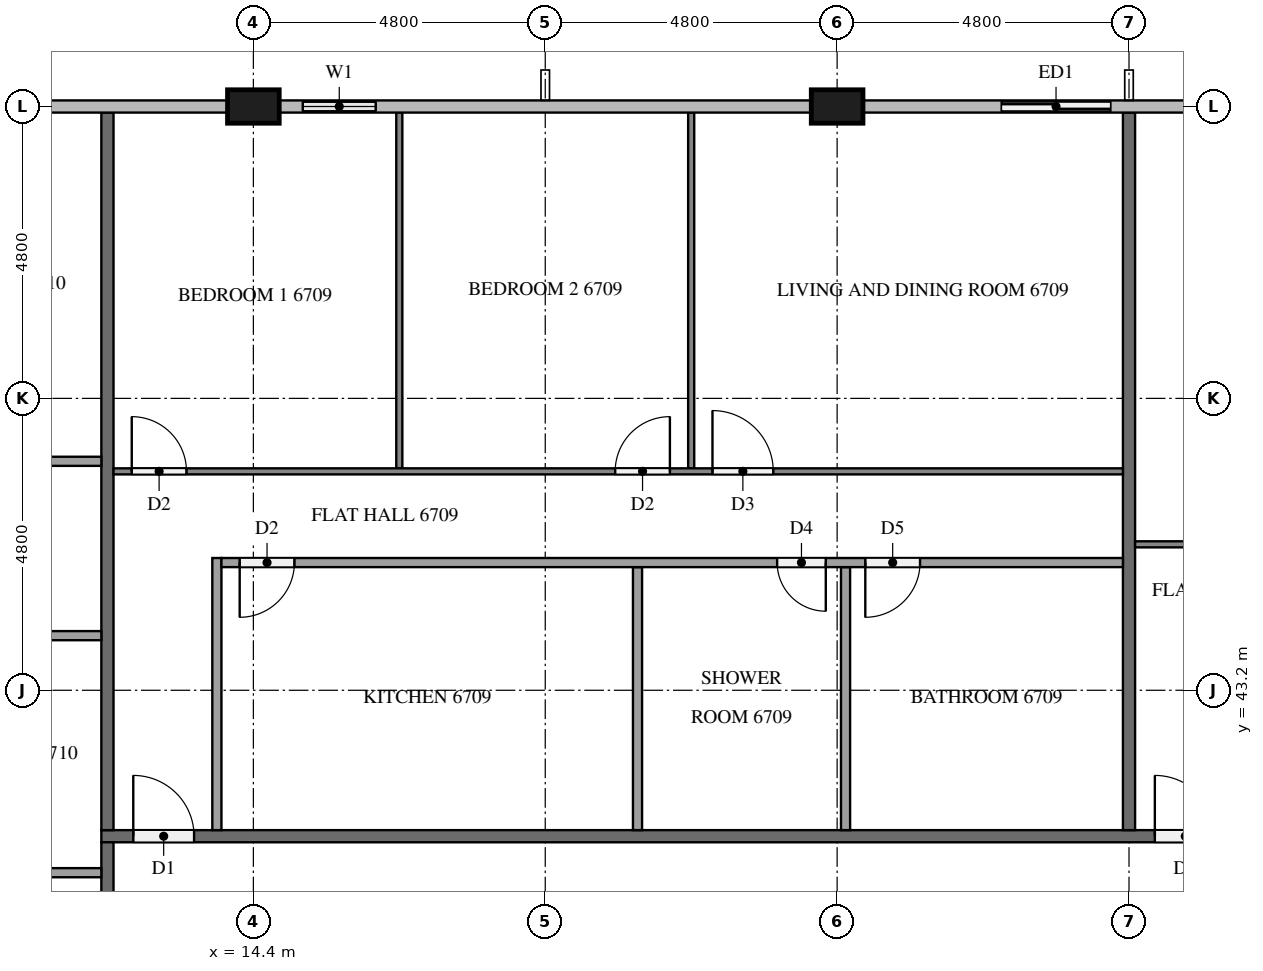
"""IFC4 building model, lengths in metres.
Left out: names, types, materials, properties, quantities, classifications, styles, units other than length and angle.
Written with IfcOpenShell. Run it as: python <this file> out.ifc"""

import sys

from ifc_helpers import new_model, si_unit, direction, frame, frame_2d, origin, origin_2d, place, context, subcontext, project, spatial, rectangle, extrude, element, fill, save


model = new_model("IFC4")
c1 = context("Model", 3, precision=1e-05, world=origin(), true_north=direction((0.0, 1.0)))
c2 = subcontext(c1, "Body", "Model", "MODEL_VIEW")
j1 = project(units=[si_unit("LENGTHUNIT", "METRE"), si_unit("PLANEANGLEUNIT", "RADIAN")], contexts=[c1])
p1 = place(None, origin())
s1 = spatial("IfcSite", under=j1, at=p1, CompositionType="ELEMENT")
p2 = place(p1, origin())
s2 = spatial("IfcBuilding", under=s1, at=p2, CompositionType="ELEMENT")
p3 = place(p2, frame((0.0, 0.0, 256.2)))
s3 = spatial("IfcBuildingStorey", under=s2, at=p3, CompositionType="ELEMENT", Elevation=256.2)
for number, where, z_axis, x_axis in (
    (1, (24.0, 52.8, 0.0), (0.0, 0.0, 1.0), (1.0, 0.0, 0.0)),
    (2, (14.4, 52.8, 0.0), (0.0, 0.0, 1.0), (1.0, 0.0, 0.0)),
):
    element("IfcColumn", number, at=place(p3, frame(where, z_axis=z_axis, x_axis=x_axis)), inside=s3, PredefinedType="COLUMN", context=c2, shape_type="SweptSolid", body=[
        extrude(rectangle(XDim=0.85, YDim=0.55, at=origin_2d()), origin(), (0.0, 0.0, 1.0), 3.2),
    ])
p4 = place(p3, frame((28.8, 52.8, 0.0), z_axis=(0.0, 0.0, 1.0), x_axis=(-1.0, 0.0, 0.0)))
e3 = element("IfcWall", 3, at=p4, inside=s3, PredefinedType="SOLIDWALL", context=c2, shape_type="SweptSolid", body=[
    extrude(rectangle(XDim=2.4, YDim=0.15, at=frame_2d((1.2, 0.0))), origin(), (0.0, 0.0, 1.0), 3.2),
])
p5 = place(p4, frame((0.3, 0.0, 0.0)))
e4 = element("IfcOpeningElement", 4, at=p5, cuts=e3, PredefinedType="OPENING", context=c2, shape_type="SweptSolid", body=[
    extrude(rectangle(XDim=1.8, YDim=2.4, at=frame_2d((0.9, 1.2))), frame((0.0, 0.085, 0.0), z_axis=(0.0, -1.0, 0.0), x_axis=(1.0, 0.0, 0.0)), (0.0, 0.0, 1.0), 0.17),
])
p6 = place(p3, frame((16.8, 52.8, 0.0), z_axis=(0.0, 0.0, 1.0), x_axis=(-1.0, 0.0, 0.0)))
e5 = element("IfcWall", 5, at=p6, inside=s3, PredefinedType="SOLIDWALL", context=c2, shape_type="SweptSolid", body=[
    extrude(rectangle(XDim=1.975, YDim=0.15, at=frame_2d((0.988, 0.0))), origin(), (0.0, 0.0, 1.0), 3.2),
])
p7 = place(p6, frame((0.387, 0.0, 0.9)))
e6 = element("IfcOpeningElement", 6, at=p7, cuts=e5, PredefinedType="OPENING", context=c2, shape_type="SweptSolid", body=[
    extrude(rectangle(XDim=1.2, YDim=1.4, at=frame_2d((0.6, 0.7))), frame((0.0, 0.085, 0.0), z_axis=(0.0, -1.0, 0.0), x_axis=(1.0, 0.0, 0.0)), (0.0, 0.0, 1.0), 0.17),
])
p8 = place(p3, frame((11.9, 40.8, 0.0), z_axis=(0.0, 0.0, 1.0), x_axis=(1.0, 0.0, 0.0)))
e7 = element("IfcWall", 7, at=p8, inside=s3, PredefinedType="PARTITIONING", context=c2, shape_type="SweptSolid", body=[
    extrude(rectangle(XDim=38.6, YDim=0.2, at=frame_2d((19.3, 0.0))), origin(), (0.0, 0.0, 1.0), 3.2),
])
p9 = place(p8, frame((31.725, 0.0, 0.0)))
e8 = element("IfcOpeningElement", 8, at=p9, cuts=e7, PredefinedType="OPENING", context=c2, shape_type="SweptSolid", body=[
    extrude(rectangle(XDim=1.0, YDim=2.1, at=frame_2d((0.5, 1.05))), frame((0.0, 0.11, 0.0), z_axis=(0.0, -1.0, 0.0), x_axis=(1.0, 0.0, 0.0)), (0.0, 0.0, 1.0), 0.22),
])
p10 = place(p8, frame((17.325, 0.0, 0.0)))
e9 = element("IfcOpeningElement", 9, at=p10, cuts=e7, PredefinedType="OPENING", context=c2, shape_type="SweptSolid", body=[
    extrude(rectangle(XDim=1.0, YDim=2.1, at=frame_2d((0.5, 1.05))), frame((0.0, 0.11, 0.0), z_axis=(0.0, -1.0, 0.0), x_axis=(1.0, 0.0, 0.0)), (0.0, 0.0, 1.0), 0.22),
])
p11 = place(p8, frame((0.525, 0.0, 0.0)))
e10 = element("IfcOpeningElement", 10, at=p11, cuts=e7, PredefinedType="OPENING", context=c2, shape_type="SweptSolid", body=[
    extrude(rectangle(XDim=1.0, YDim=2.1, at=frame_2d((0.5, 1.05))), frame((0.0, 0.11, 0.0), z_axis=(0.0, -1.0, 0.0), x_axis=(1.0, 0.0, 0.0)), (0.0, 0.0, 1.0), 0.22),
])
p12 = place(p3, frame((12.0, 12.1, 0.0), z_axis=(0.0, 0.0, 1.0), x_axis=(0.0, 1.0, 0.0)))
e11 = element("IfcWall", 11, at=p12, inside=s3, PredefinedType="PARTITIONING", context=c2, shape_type="SweptSolid", body=[
    extrude(rectangle(XDim=28.6, YDim=0.2, at=frame_2d((14.3, 0.0))), origin(), (0.0, 0.0, 1.0), 3.2),
])
p13 = place(p12, frame((26.725, 0.0, 0.0)))
e12 = element("IfcOpeningElement", 12, at=p13, cuts=e11, PredefinedType="OPENING", context=c2, shape_type="SweptSolid", body=[
    extrude(rectangle(XDim=1.0, YDim=2.1, at=frame_2d((0.5, 1.05))), frame((0.0, 0.11, 0.0), z_axis=(0.0, -1.0, 0.0), x_axis=(1.0, 0.0, 0.0)), (0.0, 0.0, 1.0), 0.22),
])
p14 = place(p12, frame((24.875, 0.0, 0.0)))
e13 = element("IfcOpeningElement", 13, at=p14, cuts=e11, PredefinedType="OPENING", context=c2, shape_type="SweptSolid", body=[
    extrude(rectangle(XDim=1.0, YDim=2.1, at=frame_2d((0.5, 1.05))), frame((0.0, 0.11, 0.0), z_axis=(0.0, -1.0, 0.0), x_axis=(1.0, 0.0, 0.0)), (0.0, 0.0, 1.0), 0.22),
])
p15 = place(p12, frame((17.675, 0.0, 0.0)))
e14 = element("IfcOpeningElement", 14, at=p15, cuts=e11, PredefinedType="OPENING", context=c2, shape_type="SweptSolid", body=[
    extrude(rectangle(XDim=1.0, YDim=2.1, at=frame_2d((0.5, 1.05))), frame((0.0, 0.11, 0.0), z_axis=(0.0, -1.0, 0.0), x_axis=(1.0, 0.0, 0.0)), (0.0, 0.0, 1.0), 0.22),
])
p16 = place(p12, frame((2.725, 0.0, 0.0)))
e15 = element("IfcOpeningElement", 15, at=p16, cuts=e11, PredefinedType="OPENING", context=c2, shape_type="SweptSolid", body=[
    extrude(rectangle(XDim=1.0, YDim=2.1, at=frame_2d((0.5, 1.05))), frame((0.0, 0.11, 0.0), z_axis=(0.0, -1.0, 0.0), x_axis=(1.0, 0.0, 0.0)), (0.0, 0.0, 1.0), 0.22),
])
p17 = place(p12, frame((0.875, 0.0, 0.0)))
e16 = element("IfcOpeningElement", 16, at=p17, cuts=e11, PredefinedType="OPENING", context=c2, shape_type="SweptSolid", body=[
    extrude(rectangle(XDim=1.0, YDim=2.1, at=frame_2d((0.5, 1.05))), frame((0.0, 0.11, 0.0), z_axis=(0.0, -1.0, 0.0), x_axis=(1.0, 0.0, 0.0)), (0.0, 0.0, 1.0), 0.22),
])
for number, where, z_axis, x_axis in (
    (17, (28.8, 52.7, 0.0), (0.0, 0.0, 1.0), (0.0, -1.0, 0.0)),
    (18, (12.0, 52.7, 0.0), (0.0, 0.0, 1.0), (0.0, -1.0, 0.0)),
):
    element("IfcWall", number, at=place(p3, frame(where, z_axis=z_axis, x_axis=x_axis)), inside=s3, PredefinedType="PARTITIONING", context=c2, shape_type="SweptSolid", body=[
        extrude(rectangle(XDim=11.8, YDim=0.2, at=frame_2d((5.9, 0.0))), origin(), (0.0, 0.0, 1.0), 3.2),
    ])
p18 = place(p3, frame((28.9, 45.6, 0.0), z_axis=(0.0, 0.0, 1.0), x_axis=(1.0, 0.0, 0.0)))
e19 = element("IfcWall", 19, at=p18, inside=s3, PredefinedType="PARTITIONING", context=c2, shape_type="SweptSolid", body=[
    extrude(rectangle(XDim=14.2, YDim=0.1, at=frame_2d((7.1, 0.0))), origin(), (0.0, 0.0, 1.0), 3.2),
])
p19 = place(p18, frame((3.35, 0.0, 0.0)))
e20 = element("IfcOpeningElement", 20, at=p19, cuts=e19, PredefinedType="OPENING", context=c2, shape_type="SweptSolid", body=[
    extrude(rectangle(XDim=1.0, YDim=2.1, at=frame_2d((0.5, 1.05))), frame((0.0, 0.06, 0.0), z_axis=(0.0, -1.0, 0.0), x_axis=(1.0, 0.0, 0.0)), (0.0, 0.0, 1.0), 0.12),
])
p20 = place(p18, frame((5.05, 0.0, 0.0)))
e21 = element("IfcOpeningElement", 21, at=p20, cuts=e19, PredefinedType="OPENING", context=c2, shape_type="SweptSolid", body=[
    extrude(rectangle(XDim=0.9, YDim=2.1, at=frame_2d((0.45, 1.05))), frame((0.0, 0.06, 0.0), z_axis=(0.0, -1.0, 0.0), x_axis=(1.0, 0.0, 0.0)), (0.0, 0.0, 1.0), 0.12),
])
p21 = place(p18, frame((13.0, 0.0, 0.0)))
e22 = element("IfcOpeningElement", 22, at=p21, cuts=e19, PredefinedType="OPENING", context=c2, shape_type="SweptSolid", body=[
    extrude(rectangle(XDim=0.9, YDim=2.1, at=frame_2d((0.45, 1.05))), frame((0.0, 0.06, 0.0), z_axis=(0.0, -1.0, 0.0), x_axis=(1.0, 0.0, 0.0)), (0.0, 0.0, 1.0), 0.12),
])
for number, where, z_axis, x_axis in (
    (23, (16.8, 46.85, 0.0), (0.0, 0.0, 1.0), (0.0, 1.0, 0.0)),
    (24, (21.6, 46.85, 0.0), (0.0, 0.0, 1.0), (0.0, 1.0, 0.0)),
):
    element("IfcWall", number, at=place(p3, frame(where, z_axis=z_axis, x_axis=x_axis)), inside=s3, PredefinedType="PARTITIONING", context=c2, shape_type="SweptSolid", body=[
        extrude(rectangle(XDim=5.85, YDim=0.1, at=frame_2d((2.925, 0.0))), origin(), (0.0, 0.0, 1.0), 3.2),
    ])
p22 = place(p3, frame((12.1, 46.8, 0.0), z_axis=(0.0, 0.0, 1.0), x_axis=(1.0, 0.0, 0.0)))
e25 = element("IfcWall", 25, at=p22, inside=s3, PredefinedType="PARTITIONING", context=c2, shape_type="SweptSolid", body=[
    extrude(rectangle(XDim=16.6, YDim=0.1, at=frame_2d((8.3, 0.0))), origin(), (0.0, 0.0, 1.0), 3.2),
])
p23 = place(p22, frame((0.3, 0.0, 0.0)))
e26 = element("IfcOpeningElement", 26, at=p23, cuts=e25, PredefinedType="OPENING", context=c2, shape_type="SweptSolid", body=[
    extrude(rectangle(XDim=0.9, YDim=2.1, at=frame_2d((0.45, 1.05))), frame((0.0, 0.06, 0.0), z_axis=(0.0, -1.0, 0.0), x_axis=(1.0, 0.0, 0.0)), (0.0, 0.0, 1.0), 0.12),
])
p24 = place(p22, frame((8.25, 0.0, 0.0)))
e27 = element("IfcOpeningElement", 27, at=p24, cuts=e25, PredefinedType="OPENING", context=c2, shape_type="SweptSolid", body=[
    extrude(rectangle(XDim=0.9, YDim=2.1, at=frame_2d((0.45, 1.05))), frame((0.0, 0.06, 0.0), z_axis=(0.0, -1.0, 0.0), x_axis=(1.0, 0.0, 0.0)), (0.0, 0.0, 1.0), 0.12),
])
p25 = place(p22, frame((9.85, 0.0, 0.0)))
e28 = element("IfcOpeningElement", 28, at=p25, cuts=e25, PredefinedType="OPENING", context=c2, shape_type="SweptSolid", body=[
    extrude(rectangle(XDim=1.0, YDim=2.1, at=frame_2d((0.5, 1.05))), frame((0.0, 0.06, 0.0), z_axis=(0.0, -1.0, 0.0), x_axis=(1.0, 0.0, 0.0)), (0.0, 0.0, 1.0), 0.12),
])
for number, where, z_axis, x_axis in (
    (29, (20.717, 40.9, 0.0), (0.0, 0.0, 1.0), (0.0, 1.0, 0.0)),
    (30, (24.138, 40.9, 0.0), (0.0, 0.0, 1.0), (0.0, 1.0, 0.0)),
):
    element("IfcWall", number, at=place(p3, frame(where, z_axis=z_axis, x_axis=x_axis)), inside=s3, PredefinedType="PARTITIONING", context=c2, shape_type="SweptSolid", body=[
        extrude(rectangle(XDim=4.325, YDim=0.15, at=frame_2d((2.163, 0.0))), origin(), (0.0, 0.0, 1.0), 3.2),
    ])
p26 = place(p3, frame((13.8, 40.9, 0.0), z_axis=(0.0, 0.0, 1.0), x_axis=(0.0, 1.0, 0.0)))
e31 = element("IfcWall", 31, at=p26, inside=s3, PredefinedType="PARTITIONING", context=c2, shape_type="SweptSolid", body=[
    extrude(rectangle(XDim=4.475, YDim=0.15, at=frame_2d((2.238, 0.0))), origin(), (0.0, 0.0, 1.0), 3.2),
])
p27 = place(p3, frame((28.7, 45.3, 0.0), z_axis=(0.0, 0.0, 1.0), x_axis=(-1.0, 0.0, 0.0)))
e32 = element("IfcWall", 32, at=p27, inside=s3, PredefinedType="PARTITIONING", context=c2, shape_type="SweptSolid", body=[
    extrude(rectangle(XDim=14.825, YDim=0.15, at=frame_2d((7.413, 0.0))), origin(), (0.0, 0.0, 1.0), 3.2),
])
p28 = place(p27, frame((13.625, 0.0, 0.0)))
e33 = element("IfcOpeningElement", 33, at=p28, cuts=e32, PredefinedType="OPENING", context=c2, shape_type="SweptSolid", body=[
    extrude(rectangle(XDim=0.9, YDim=2.1, at=frame_2d((0.45, 1.05))), frame((0.0, 0.085, 0.0), z_axis=(0.0, -1.0, 0.0), x_axis=(1.0, 0.0, 0.0)), (0.0, 0.0, 1.0), 0.17),
])
p29 = place(p27, frame((4.886, 0.0, 0.0)))
e34 = element("IfcOpeningElement", 34, at=p29, cuts=e32, PredefinedType="OPENING", context=c2, shape_type="SweptSolid", body=[
    extrude(rectangle(XDim=0.8, YDim=2.1, at=frame_2d((0.4, 1.05))), frame((0.0, 0.085, 0.0), z_axis=(0.0, -1.0, 0.0), x_axis=(1.0, 0.0, 0.0)), (0.0, 0.0, 1.0), 0.17),
])
p30 = place(p27, frame((3.336, 0.0, 0.0)))
e35 = element("IfcOpeningElement", 35, at=p30, cuts=e32, PredefinedType="OPENING", context=c2, shape_type="SweptSolid", body=[
    extrude(rectangle(XDim=0.9, YDim=2.1, at=frame_2d((0.45, 1.05))), frame((0.0, 0.085, 0.0), z_axis=(0.0, -1.0, 0.0), x_axis=(1.0, 0.0, 0.0)), (0.0, 0.0, 1.0), 0.17),
])
for number, where, z_axis, x_axis in (
    (36, (11.9, 44.098, 0.0), (0.0, 0.0, 1.0), (-1.0, 0.0, 0.0)),
    (37, (11.9, 46.965, 0.0), (0.0, 0.0, 1.0), (-1.0, 0.0, 0.0)),
):
    element("IfcWall", number, at=place(p3, frame(where, z_axis=z_axis, x_axis=x_axis)), inside=s3, PredefinedType="PARTITIONING", context=c2, shape_type="SweptSolid", body=[
        extrude(rectangle(XDim=3.275, YDim=0.15, at=frame_2d((1.637, 0.0))), origin(), (0.0, 0.0, 1.0), 3.2),
    ])
p31 = place(p3, frame((11.9, 40.2, 0.0), z_axis=(0.0, 0.0, 1.0), x_axis=(-1.0, 0.0, 0.0)))
e38 = element("IfcWall", 38, at=p31, inside=s3, PredefinedType="PARTITIONING", context=c2, shape_type="SweptSolid", body=[
    extrude(rectangle(XDim=3.425, YDim=0.15, at=frame_2d((1.712, 0.0))), origin(), (0.0, 0.0, 1.0), 3.2),
])
p32 = place(p5, origin())
e39 = element("IfcDoor", 39, at=p32, inside=s3, OperationType="SLIDING_TO_LEFT", PredefinedType="DOOR", context=c2, shape_type="SweptSolid", body=[
    extrude(rectangle(XDim=1.8, YDim=2.4, at=frame_2d((0.9, 1.2))), frame((0.0, 0.025, 0.0), z_axis=(0.0, -1.0, 0.0), x_axis=(1.0, 0.0, 0.0)), (0.0, 0.0, 1.0), 0.05),
])
fill(e4, e39)
p33 = place(p7, origin())
e40 = element("IfcWindow", 40, at=p33, inside=s3, PartitioningType="SINGLE_PANEL", PredefinedType="WINDOW", context=c2, shape_type="SweptSolid", body=[
    extrude(rectangle(XDim=1.2, YDim=1.4, at=frame_2d((0.6, 0.7))), frame((0.0, 0.03, 0.0), z_axis=(0.0, -1.0, 0.0), x_axis=(1.0, 0.0, 0.0)), (0.0, 0.0, 1.0), 0.06),
])
fill(e6, e40)
p34 = place(p10, origin())
e41 = element("IfcDoor", 41, at=p34, inside=s3, OperationType="SINGLE_SWING_LEFT", PredefinedType="DOOR", context=c2, shape_type="SweptSolid", body=[
    extrude(rectangle(XDim=1.0, YDim=2.1, at=frame_2d((0.5, 1.05))), frame((0.0, 0.025, 0.0), z_axis=(0.0, -1.0, 0.0), x_axis=(1.0, 0.0, 0.0)), (0.0, 0.0, 1.0), 0.05),
])
fill(e9, e41)
p35 = place(p11, origin())
e42 = element("IfcDoor", 42, at=p35, inside=s3, OperationType="SINGLE_SWING_LEFT", PredefinedType="DOOR", context=c2, shape_type="SweptSolid", body=[
    extrude(rectangle(XDim=1.0, YDim=2.1, at=frame_2d((0.5, 1.05))), frame((0.0, 0.025, 0.0), z_axis=(0.0, -1.0, 0.0), x_axis=(1.0, 0.0, 0.0)), (0.0, 0.0, 1.0), 0.05),
])
fill(e10, e42)
p36 = place(p23, origin())
e43 = element("IfcDoor", 43, at=p36, inside=s3, OperationType="SINGLE_SWING_LEFT", PredefinedType="DOOR", context=c2, shape_type="SweptSolid", body=[
    extrude(rectangle(XDim=0.9, YDim=2.1, at=frame_2d((0.45, 1.05))), frame((0.0, 0.025, 0.0), z_axis=(0.0, -1.0, 0.0), x_axis=(1.0, 0.0, 0.0)), (0.0, 0.0, 1.0), 0.05),
])
fill(e26, e43)
p37 = place(p24, origin())
e44 = element("IfcDoor", 44, at=p37, inside=s3, OperationType="SINGLE_SWING_RIGHT", PredefinedType="DOOR", context=c2, shape_type="SweptSolid", body=[
    extrude(rectangle(XDim=0.9, YDim=2.1, at=frame_2d((0.45, 1.05))), frame((0.0, 0.025, 0.0), z_axis=(0.0, -1.0, 0.0), x_axis=(1.0, 0.0, 0.0)), (0.0, 0.0, 1.0), 0.05),
])
fill(e27, e44)
p38 = place(p25, origin())
e45 = element("IfcDoor", 45, at=p38, inside=s3, OperationType="SINGLE_SWING_LEFT", PredefinedType="DOOR", context=c2, shape_type="SweptSolid", body=[
    extrude(rectangle(XDim=1.0, YDim=2.1, at=frame_2d((0.5, 1.05))), frame((0.0, 0.025, 0.0), z_axis=(0.0, -1.0, 0.0), x_axis=(1.0, 0.0, 0.0)), (0.0, 0.0, 1.0), 0.05),
])
fill(e28, e45)
p39 = place(p28, origin())
e46 = element("IfcDoor", 46, at=p39, inside=s3, OperationType="SINGLE_SWING_RIGHT", PredefinedType="DOOR", context=c2, shape_type="SweptSolid", body=[
    extrude(rectangle(XDim=0.9, YDim=2.1, at=frame_2d((0.45, 1.05))), frame((0.0, 0.025, 0.0), z_axis=(0.0, -1.0, 0.0), x_axis=(1.0, 0.0, 0.0)), (0.0, 0.0, 1.0), 0.05),
])
fill(e33, e46)
p40 = place(p29, origin())
e47 = element("IfcDoor", 47, at=p40, inside=s3, OperationType="SINGLE_SWING_LEFT", PredefinedType="DOOR", context=c2, shape_type="SweptSolid", body=[
    extrude(rectangle(XDim=0.8, YDim=2.1, at=frame_2d((0.4, 1.05))), frame((0.0, 0.025, 0.0), z_axis=(0.0, -1.0, 0.0), x_axis=(1.0, 0.0, 0.0)), (0.0, 0.0, 1.0), 0.05),
])
fill(e34, e47)
p41 = place(p30, origin())
e48 = element("IfcDoor", 48, at=p41, inside=s3, OperationType="SINGLE_SWING_RIGHT", PredefinedType="DOOR", context=c2, shape_type="SweptSolid", body=[
    extrude(rectangle(XDim=0.9, YDim=2.1, at=frame_2d((0.45, 1.05))), frame((0.0, 0.025, 0.0), z_axis=(0.0, -1.0, 0.0), x_axis=(1.0, 0.0, 0.0)), (0.0, 0.0, 1.0), 0.05),
])
fill(e35, e48)
save(model, sys.argv[1])
